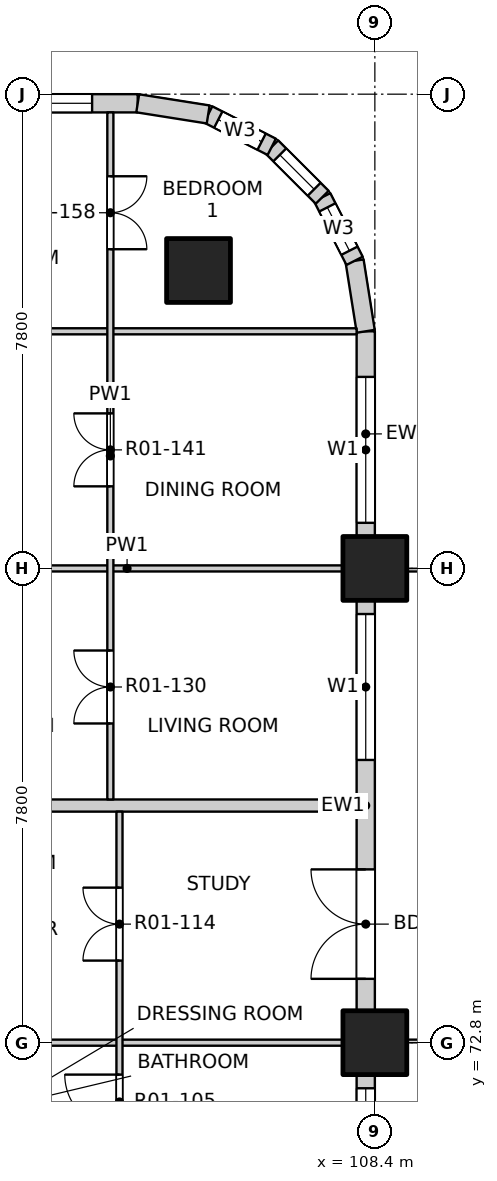
"""IFC4 building model, lengths in metres.
Left out: names, types, materials, properties, quantities, classifications, styles, units other than length and angle.
Written with IfcOpenShell. Run it as: python <this file> out.ifc"""

import sys

from ifc_helpers import new_model, si_unit, direction, frame, frame_2d, origin, origin_2d, place, context, subcontext, project, spatial, rectangle, extrude, element, fill, save


model = new_model("IFC4")
c1 = context("Model", 3, precision=1e-05, world=origin(), true_north=direction((0.0, 1.0)))
c2 = subcontext(c1, "Body", "Model", "MODEL_VIEW")
j1 = project(units=[si_unit("LENGTHUNIT", "METRE"), si_unit("PLANEANGLEUNIT", "RADIAN")], contexts=[c1])
p1 = place(None, origin())
s1 = spatial("IfcSite", under=j1, at=p1, CompositionType="ELEMENT")
p2 = place(p1, origin())
s2 = spatial("IfcBuilding", under=s1, at=p2, CompositionType="ELEMENT")
p3 = place(p2, frame((0.0, 0.0, 19.5)))
s3 = spatial("IfcBuildingStorey", under=s2, at=p3, CompositionType="ELEMENT", Elevation=19.5)
for number, where, z_axis, x_axis in (
    (1, (105.5, 85.5, -0.25), (0.0, 0.0, 1.0), (1.0, 0.0, 0.0)),
    (2, (108.4, 72.8, -0.25), (0.0, 0.0, 1.0), (1.0, 0.0, 0.0)),
    (3, (108.4, 80.6, -0.25), (0.0, 0.0, 1.0), (1.0, 0.0, 0.0)),
):
    element("IfcColumn", number, at=place(p3, frame(where, z_axis=z_axis, x_axis=x_axis)), inside=s3, PredefinedType="COLUMN", context=c2, shape_type="SweptSolid", body=[
        extrude(rectangle(XDim=1.05, YDim=1.05, at=origin_2d()), origin(), (0.0, 0.0, 1.0), 3.4),
    ])
p4 = place(p3, frame((108.25, 65.525, 0.0), z_axis=(0.0, 0.0, 1.0), x_axis=(0.0, 1.0, 0.0)))
e4 = element("IfcWall", 4, at=p4, inside=s3, PredefinedType="SOLIDWALL", context=c2, shape_type="SweptSolid", body=[
    extrude(rectangle(XDim=6.75, YDim=0.3, at=frame_2d((3.375, 0.0))), origin(), (0.0, 0.0, 1.0), 2.7),
])
p5 = place(p4, frame((0.225, 0.0, 0.9)))
e5 = element("IfcOpeningElement", 5, at=p5, cuts=e4, PredefinedType="OPENING", context=c2, shape_type="SweptSolid", body=[
    extrude(rectangle(XDim=2.4, YDim=1.8, at=frame_2d((1.2, 0.9))), frame((0.0, 0.16, 0.0), z_axis=(0.0, -1.0, 0.0), x_axis=(1.0, 0.0, 0.0)), (0.0, 0.0, 1.0), 0.32),
])
p6 = place(p4, frame((4.125, 0.0, 0.9)))
e6 = element("IfcOpeningElement", 6, at=p6, cuts=e4, PredefinedType="OPENING", context=c2, shape_type="SweptSolid", body=[
    extrude(rectangle(XDim=2.4, YDim=1.8, at=frame_2d((1.2, 0.9))), frame((0.0, 0.16, 0.0), z_axis=(0.0, -1.0, 0.0), x_axis=(1.0, 0.0, 0.0)), (0.0, 0.0, 1.0), 0.32),
])
p7 = place(p3, frame((108.25, 73.325, 0.0), z_axis=(0.0, 0.0, 1.0), x_axis=(0.0, 1.0, 0.0)))
e7 = element("IfcWall", 7, at=p7, inside=s3, PredefinedType="SOLIDWALL", context=c2, shape_type="SweptSolid", body=[
    extrude(rectangle(XDim=6.75, YDim=0.3, at=frame_2d((3.375, 0.0))), origin(), (0.0, 0.0, 1.0), 2.7),
])
p8 = place(p7, frame((0.525, 0.0, 0.0)))
e8 = element("IfcOpeningElement", 8, at=p8, cuts=e7, PredefinedType="OPENING", context=c2, shape_type="SweptSolid", body=[
    extrude(rectangle(XDim=1.8, YDim=2.4, at=frame_2d((0.9, 1.2))), frame((0.0, 0.16, 0.0), z_axis=(0.0, -1.0, 0.0), x_axis=(1.0, 0.0, 0.0)), (0.0, 0.0, 1.0), 0.32),
])
p9 = place(p7, frame((4.125, 0.0, 0.9)))
e9 = element("IfcOpeningElement", 9, at=p9, cuts=e7, PredefinedType="OPENING", context=c2, shape_type="SweptSolid", body=[
    extrude(rectangle(XDim=2.4, YDim=1.8, at=frame_2d((1.2, 0.9))), frame((0.0, 0.16, 0.0), z_axis=(0.0, -1.0, 0.0), x_axis=(1.0, 0.0, 0.0)), (0.0, 0.0, 1.0), 0.32),
])
p10 = place(p3, frame((108.25, 81.125, 0.0), z_axis=(0.0, 0.0, 1.0), x_axis=(0.0, 1.0, 0.0)))
e10 = element("IfcWall", 10, at=p10, inside=s3, PredefinedType="SOLIDWALL", context=c2, shape_type="SweptSolid", body=[
    extrude(rectangle(XDim=3.375, YDim=0.3, at=frame_2d((1.688, 0.0))), origin(), (0.0, 0.0, 1.0), 2.7),
])
p11 = place(p10, frame((0.225, 0.0, 0.9)))
e11 = element("IfcOpeningElement", 11, at=p11, cuts=e10, PredefinedType="OPENING", context=c2, shape_type="SweptSolid", body=[
    extrude(rectangle(XDim=2.4, YDim=1.8, at=frame_2d((1.2, 0.9))), frame((0.0, 0.16, 0.0), z_axis=(0.0, -1.0, 0.0), x_axis=(1.0, 0.0, 0.0)), (0.0, 0.0, 1.0), 0.32),
])
p12 = place(p3, frame((101.125, 88.25, 0.0), z_axis=(0.0, 0.0, 1.0), x_axis=(1.0, 0.0, 0.0)))
e12 = element("IfcWall", 12, at=p12, inside=s3, PredefinedType="SOLIDWALL", context=c2, shape_type="SweptSolid", body=[
    extrude(rectangle(XDim=3.375, YDim=0.3, at=frame_2d((1.688, 0.0))), origin(), (0.0, 0.0, 1.0), 2.7),
])
p13 = place(p12, frame((0.225, 0.0, 0.9)))
e13 = element("IfcOpeningElement", 13, at=p13, cuts=e12, PredefinedType="OPENING", context=c2, shape_type="SweptSolid", body=[
    extrude(rectangle(XDim=2.4, YDim=1.8, at=frame_2d((1.2, 0.9))), frame((0.0, 0.16, 0.0), z_axis=(0.0, -1.0, 0.0), x_axis=(1.0, 0.0, 0.0)), (0.0, 0.0, 1.0), 0.32),
])
p14 = place(p3, frame((108.25, 84.5, 0.0), z_axis=(0.0, 0.0, 1.0), x_axis=(-0.156496880861, 0.987678452879, 0.0)))
e14 = element("IfcWall", 14, at=p14, inside=s3, PredefinedType="SOLIDWALL", context=c2, shape_type="SweptSolid", body=[
    extrude(rectangle(XDim=1.173, YDim=0.3, at=frame_2d((0.586, 0.0))), origin(), (0.0, 0.0, 1.0), 2.7),
])
p15 = place(p3, frame((108.066, 85.659, 0.0), z_axis=(0.0, 0.0, 1.0), x_axis=(-0.454025524128, 0.890988677504, 0.0)))
e15 = element("IfcWall", 15, at=p15, inside=s3, PredefinedType="SOLIDWALL", context=c2, shape_type="SweptSolid", body=[
    extrude(rectangle(XDim=1.173, YDim=0.3, at=frame_2d((0.587, 0.0))), origin(), (0.0, 0.0, 1.0), 2.7),
])
p16 = place(p15, frame((0.187, 0.0, 0.9)))
e16 = element("IfcOpeningElement", 16, at=p16, cuts=e15, PredefinedType="OPENING", context=c2, shape_type="SweptSolid", body=[
    extrude(rectangle(XDim=0.8, YDim=1.2, at=frame_2d((0.4, 0.6))), frame((0.0, 0.16, 0.0), z_axis=(0.0, -1.0, 0.0), x_axis=(1.0, 0.0, 0.0)), (0.0, 0.0, 1.0), 0.32),
])
p17 = place(p3, frame((107.534, 86.704, 0.0), z_axis=(0.0, 0.0, 1.0), x_axis=(-0.707106781187, 0.707106781187, 0.0)))
e17 = element("IfcWall", 17, at=p17, inside=s3, PredefinedType="SOLIDWALL", context=c2, shape_type="SweptSolid", body=[
    extrude(rectangle(XDim=1.173, YDim=0.3, at=frame_2d((0.586, 0.0))), origin(), (0.0, 0.0, 1.0), 2.7),
])
p18 = place(p17, frame((0.187, 0.0, 0.9)))
e18 = element("IfcOpeningElement", 18, at=p18, cuts=e17, PredefinedType="OPENING", context=c2, shape_type="SweptSolid", body=[
    extrude(rectangle(XDim=0.8, YDim=1.2, at=frame_2d((0.4, 0.6))), frame((0.0, 0.16, 0.0), z_axis=(0.0, -1.0, 0.0), x_axis=(1.0, 0.0, 0.0)), (0.0, 0.0, 1.0), 0.32),
])
p19 = place(p3, frame((106.704, 87.534, 0.0), z_axis=(0.0, 0.0, 1.0), x_axis=(-0.890988677504, 0.454025524128, 0.0)))
e19 = element("IfcWall", 19, at=p19, inside=s3, PredefinedType="SOLIDWALL", context=c2, shape_type="SweptSolid", body=[
    extrude(rectangle(XDim=1.173, YDim=0.3, at=frame_2d((0.587, 0.0))), origin(), (0.0, 0.0, 1.0), 2.7),
])
p20 = place(p19, frame((0.187, 0.0, 0.9)))
e20 = element("IfcOpeningElement", 20, at=p20, cuts=e19, PredefinedType="OPENING", context=c2, shape_type="SweptSolid", body=[
    extrude(rectangle(XDim=0.8, YDim=1.2, at=frame_2d((0.4, 0.6))), frame((0.0, 0.16, 0.0), z_axis=(0.0, -1.0, 0.0), x_axis=(1.0, 0.0, 0.0)), (0.0, 0.0, 1.0), 0.32),
])
p21 = place(p3, frame((105.659, 88.066, 0.0), z_axis=(0.0, 0.0, 1.0), x_axis=(-0.987678452879, 0.156496880861, 0.0)))
e21 = element("IfcWall", 21, at=p21, inside=s3, PredefinedType="SOLIDWALL", context=c2, shape_type="SweptSolid", body=[
    extrude(rectangle(XDim=1.173, YDim=0.3, at=frame_2d((0.586, 0.0))), origin(), (0.0, 0.0, 1.0), 2.7),
])
p22 = place(p3, frame((100.55, 72.8, 0.0), z_axis=(0.0, 0.0, 1.0), x_axis=(1.0, 0.0, 0.0)))
e22 = element("IfcWall", 22, at=p22, inside=s3, PredefinedType="PARTITIONING", context=c2, shape_type="SweptSolid", body=[
    extrude(rectangle(XDim=7.55, YDim=0.1, at=frame_2d((3.775, 0.0))), origin(), (0.0, 0.0, 1.0), 2.55),
])
p23 = place(p3, frame((96.6, 76.7, 0.0), z_axis=(0.0, 0.0, 1.0), x_axis=(1.0, 0.0, 0.0)))
e23 = element("IfcWall", 23, at=p23, inside=s3, PredefinedType="PARTITIONING", context=c2, shape_type="SweptSolid", body=[
    extrude(rectangle(XDim=11.5, YDim=0.2, at=frame_2d((5.75, 0.0))), origin(), (0.0, 0.0, 1.0), 3.15),
])
p24 = place(p3, frame((100.55, 80.6, 0.0), z_axis=(0.0, 0.0, 1.0), x_axis=(1.0, 0.0, 0.0)))
e24 = element("IfcWall", 24, at=p24, inside=s3, PredefinedType="PARTITIONING", context=c2, shape_type="SweptSolid", body=[
    extrude(rectangle(XDim=7.55, YDim=0.1, at=frame_2d((3.775, 0.0))), origin(), (0.0, 0.0, 1.0), 2.55),
])
p25 = place(p3, frame((96.6, 84.5, 0.0), z_axis=(0.0, 0.0, 1.0), x_axis=(1.0, 0.0, 0.0)))
e25 = element("IfcWall", 25, at=p25, inside=s3, PredefinedType="PARTITIONING", context=c2, shape_type="SweptSolid", body=[
    extrude(rectangle(XDim=11.5, YDim=0.1, at=frame_2d((5.75, 0.0))), origin(), (0.0, 0.0, 1.0), 3.15),
])
p26 = place(p25, frame((2.635, 0.0, 0.0)))
e26 = element("IfcOpeningElement", 26, at=p26, cuts=e25, PredefinedType="OPENING", context=c2, shape_type="SweptSolid", body=[
    extrude(rectangle(XDim=0.9, YDim=2.1, at=frame_2d((0.45, 1.05))), frame((0.0, 0.06, 0.0), z_axis=(0.0, -1.0, 0.0), x_axis=(1.0, 0.0, 0.0)), (0.0, 0.0, 1.0), 0.12),
])
p27 = place(p3, frame((104.05, 76.8, 0.0), z_axis=(0.0, 0.0, 1.0), x_axis=(0.0, 1.0, 0.0)))
e27 = element("IfcWall", 27, at=p27, inside=s3, PredefinedType="PARTITIONING", context=c2, shape_type="SweptSolid", body=[
    extrude(rectangle(XDim=11.3, YDim=0.1, at=frame_2d((5.65, 0.0))), origin(), (0.0, 0.0, 1.0), 3.15),
])
p28 = place(p27, frame((1.25, 0.0, 0.0)))
e28 = element("IfcOpeningElement", 28, at=p28, cuts=e27, PredefinedType="OPENING", context=c2, shape_type="SweptSolid", body=[
    extrude(rectangle(XDim=1.2, YDim=2.1, at=frame_2d((0.6, 1.05))), frame((0.0, 0.06, 0.0), z_axis=(0.0, -1.0, 0.0), x_axis=(1.0, 0.0, 0.0)), (0.0, 0.0, 1.0), 0.12),
])
p29 = place(p27, frame((5.15, 0.0, 0.0)))
e29 = element("IfcOpeningElement", 29, at=p29, cuts=e27, PredefinedType="OPENING", context=c2, shape_type="SweptSolid", body=[
    extrude(rectangle(XDim=1.2, YDim=2.1, at=frame_2d((0.6, 1.05))), frame((0.0, 0.06, 0.0), z_axis=(0.0, -1.0, 0.0), x_axis=(1.0, 0.0, 0.0)), (0.0, 0.0, 1.0), 0.12),
])
p30 = place(p27, frame((9.05, 0.0, 0.0)))
e30 = element("IfcOpeningElement", 30, at=p30, cuts=e27, PredefinedType="OPENING", context=c2, shape_type="SweptSolid", body=[
    extrude(rectangle(XDim=1.2, YDim=2.1, at=frame_2d((0.6, 1.05))), frame((0.0, 0.06, 0.0), z_axis=(0.0, -1.0, 0.0), x_axis=(1.0, 0.0, 0.0)), (0.0, 0.0, 1.0), 0.12),
])
p31 = place(p3, frame((104.2, 61.2, 0.0), z_axis=(0.0, 0.0, 1.0), x_axis=(0.0, 1.0, 0.0)))
e31 = element("IfcWall", 31, at=p31, inside=s3, PredefinedType="PARTITIONING", context=c2, shape_type="SweptSolid", body=[
    extrude(rectangle(XDim=15.4, YDim=0.1, at=frame_2d((7.7, 0.0))), origin(), (0.0, 0.0, 1.0), 3.15),
])
p32 = place(p31, frame((0.425, 0.0, 0.0)))
e32 = element("IfcOpeningElement", 32, at=p32, cuts=e31, PredefinedType="OPENING", context=c2, shape_type="SweptSolid", body=[
    extrude(rectangle(XDim=0.9, YDim=2.1, at=frame_2d((0.45, 1.05))), frame((0.0, 0.06, 0.0), z_axis=(0.0, -1.0, 0.0), x_axis=(1.0, 0.0, 0.0)), (0.0, 0.0, 1.0), 0.12),
])
p33 = place(p31, frame((2.375, 0.0, 0.0)))
e33 = element("IfcOpeningElement", 33, at=p33, cuts=e31, PredefinedType="OPENING", context=c2, shape_type="SweptSolid", body=[
    extrude(rectangle(XDim=0.9, YDim=2.1, at=frame_2d((0.45, 1.05))), frame((0.0, 0.06, 0.0), z_axis=(0.0, -1.0, 0.0), x_axis=(1.0, 0.0, 0.0)), (0.0, 0.0, 1.0), 0.12),
])
p34 = place(p31, frame((5.15, 0.0, 0.0)))
e34 = element("IfcOpeningElement", 34, at=p34, cuts=e31, PredefinedType="OPENING", context=c2, shape_type="SweptSolid", body=[
    extrude(rectangle(XDim=1.2, YDim=2.1, at=frame_2d((0.6, 1.05))), frame((0.0, 0.06, 0.0), z_axis=(0.0, -1.0, 0.0), x_axis=(1.0, 0.0, 0.0)), (0.0, 0.0, 1.0), 0.12),
])
p35 = place(p31, frame((8.225, 0.0, 0.0)))
e35 = element("IfcOpeningElement", 35, at=p35, cuts=e31, PredefinedType="OPENING", context=c2, shape_type="SweptSolid", body=[
    extrude(rectangle(XDim=0.9, YDim=2.1, at=frame_2d((0.45, 1.05))), frame((0.0, 0.06, 0.0), z_axis=(0.0, -1.0, 0.0), x_axis=(1.0, 0.0, 0.0)), (0.0, 0.0, 1.0), 0.12),
])
p36 = place(p31, frame((10.175, 0.0, 0.0)))
e36 = element("IfcOpeningElement", 36, at=p36, cuts=e31, PredefinedType="OPENING", context=c2, shape_type="SweptSolid", body=[
    extrude(rectangle(XDim=0.9, YDim=2.1, at=frame_2d((0.45, 1.05))), frame((0.0, 0.06, 0.0), z_axis=(0.0, -1.0, 0.0), x_axis=(1.0, 0.0, 0.0)), (0.0, 0.0, 1.0), 0.12),
])
p37 = place(p31, frame((12.95, 0.0, 0.0)))
e37 = element("IfcOpeningElement", 37, at=p37, cuts=e31, PredefinedType="OPENING", context=c2, shape_type="SweptSolid", body=[
    extrude(rectangle(XDim=1.2, YDim=2.1, at=frame_2d((0.6, 1.05))), frame((0.0, 0.06, 0.0), z_axis=(0.0, -1.0, 0.0), x_axis=(1.0, 0.0, 0.0)), (0.0, 0.0, 1.0), 0.12),
])
p38 = place(p6, origin())
e38 = element("IfcWindow", 38, at=p38, inside=s3, PartitioningType="DOUBLE_PANEL_VERTICAL", PredefinedType="WINDOW", context=c2, shape_type="SweptSolid", body=[
    extrude(rectangle(XDim=2.4, YDim=1.8, at=frame_2d((1.2, 0.9))), frame((0.0, 0.03, 0.0), z_axis=(0.0, -1.0, 0.0), x_axis=(1.0, 0.0, 0.0)), (0.0, 0.0, 1.0), 0.06),
])
fill(e6, e38)
p39 = place(p8, origin())
e39 = element("IfcDoor", 39, at=p39, inside=s3, OperationType="DOUBLE_DOOR_SINGLE_SWING", PredefinedType="DOOR", context=c2, shape_type="SweptSolid", body=[
    extrude(rectangle(XDim=1.8, YDim=2.4, at=frame_2d((0.9, 1.2))), frame((0.0, 0.025, 0.0), z_axis=(0.0, -1.0, 0.0), x_axis=(1.0, 0.0, 0.0)), (0.0, 0.0, 1.0), 0.05),
])
fill(e8, e39)
p40 = place(p9, origin())
e40 = element("IfcWindow", 40, at=p40, inside=s3, PartitioningType="DOUBLE_PANEL_VERTICAL", PredefinedType="WINDOW", context=c2, shape_type="SweptSolid", body=[
    extrude(rectangle(XDim=2.4, YDim=1.8, at=frame_2d((1.2, 0.9))), frame((0.0, 0.03, 0.0), z_axis=(0.0, -1.0, 0.0), x_axis=(1.0, 0.0, 0.0)), (0.0, 0.0, 1.0), 0.06),
])
fill(e9, e40)
p41 = place(p11, origin())
e41 = element("IfcWindow", 41, at=p41, inside=s3, PartitioningType="DOUBLE_PANEL_VERTICAL", PredefinedType="WINDOW", context=c2, shape_type="SweptSolid", body=[
    extrude(rectangle(XDim=2.4, YDim=1.8, at=frame_2d((1.2, 0.9))), frame((0.0, 0.03, 0.0), z_axis=(0.0, -1.0, 0.0), x_axis=(1.0, 0.0, 0.0)), (0.0, 0.0, 1.0), 0.06),
])
fill(e11, e41)
p42 = place(p13, origin())
e42 = element("IfcWindow", 42, at=p42, inside=s3, PartitioningType="DOUBLE_PANEL_VERTICAL", PredefinedType="WINDOW", context=c2, shape_type="SweptSolid", body=[
    extrude(rectangle(XDim=2.4, YDim=1.8, at=frame_2d((1.2, 0.9))), frame((0.0, 0.03, 0.0), z_axis=(0.0, -1.0, 0.0), x_axis=(1.0, 0.0, 0.0)), (0.0, 0.0, 1.0), 0.06),
])
fill(e13, e42)
p43 = place(p16, origin())
e43 = element("IfcWindow", 43, at=p43, inside=s3, PartitioningType="SINGLE_PANEL", PredefinedType="WINDOW", context=c2, shape_type="SweptSolid", body=[
    extrude(rectangle(XDim=0.8, YDim=1.2, at=frame_2d((0.4, 0.6))), frame((0.0, 0.03, 0.0), z_axis=(0.0, -1.0, 0.0), x_axis=(1.0, 0.0, 0.0)), (0.0, 0.0, 1.0), 0.06),
])
fill(e16, e43)
p44 = place(p18, origin())
e44 = element("IfcWindow", 44, at=p44, inside=s3, PartitioningType="SINGLE_PANEL", PredefinedType="WINDOW", context=c2, shape_type="SweptSolid", body=[
    extrude(rectangle(XDim=0.8, YDim=1.2, at=frame_2d((0.4, 0.6))), frame((0.0, 0.03, 0.0), z_axis=(0.0, -1.0, 0.0), x_axis=(1.0, 0.0, 0.0)), (0.0, 0.0, 1.0), 0.06),
])
fill(e18, e44)
p45 = place(p20, origin())
e45 = element("IfcWindow", 45, at=p45, inside=s3, PartitioningType="SINGLE_PANEL", PredefinedType="WINDOW", context=c2, shape_type="SweptSolid", body=[
    extrude(rectangle(XDim=0.8, YDim=1.2, at=frame_2d((0.4, 0.6))), frame((0.0, 0.03, 0.0), z_axis=(0.0, -1.0, 0.0), x_axis=(1.0, 0.0, 0.0)), (0.0, 0.0, 1.0), 0.06),
])
fill(e20, e45)
p46 = place(p36, origin())
e46 = element("IfcDoor", 46, at=p46, inside=s3, OperationType="SINGLE_SWING_RIGHT", PredefinedType="DOOR", context=c2, shape_type="SweptSolid", body=[
    extrude(rectangle(XDim=0.9, YDim=2.1, at=frame_2d((0.45, 1.05))), frame((0.0, 0.025, 0.0), z_axis=(0.0, -1.0, 0.0), x_axis=(1.0, 0.0, 0.0)), (0.0, 0.0, 1.0), 0.05),
])
fill(e36, e46)
p47 = place(p37, origin())
e47 = element("IfcDoor", 47, at=p47, inside=s3, OperationType="DOUBLE_DOOR_SINGLE_SWING", PredefinedType="DOOR", context=c2, shape_type="SweptSolid", body=[
    extrude(rectangle(XDim=1.2, YDim=2.1, at=frame_2d((0.6, 1.05))), frame((0.0, 0.025, 0.0), z_axis=(0.0, -1.0, 0.0), x_axis=(1.0, 0.0, 0.0)), (0.0, 0.0, 1.0), 0.05),
])
fill(e37, e47)
p48 = place(p28, origin())
e48 = element("IfcDoor", 48, at=p48, inside=s3, OperationType="DOUBLE_DOOR_SINGLE_SWING", PredefinedType="DOOR", context=c2, shape_type="SweptSolid", body=[
    extrude(rectangle(XDim=1.2, YDim=2.1, at=frame_2d((0.6, 1.05))), frame((0.0, 0.025, 0.0), z_axis=(0.0, -1.0, 0.0), x_axis=(1.0, 0.0, 0.0)), (0.0, 0.0, 1.0), 0.05),
])
fill(e28, e48)
p49 = place(p29, origin())
e49 = element("IfcDoor", 49, at=p49, inside=s3, OperationType="DOUBLE_DOOR_SINGLE_SWING", PredefinedType="DOOR", context=c2, shape_type="SweptSolid", body=[
    extrude(rectangle(XDim=1.2, YDim=2.1, at=frame_2d((0.6, 1.05))), frame((0.0, 0.025, 0.0), z_axis=(0.0, -1.0, 0.0), x_axis=(1.0, 0.0, 0.0)), (0.0, 0.0, 1.0), 0.05),
])
fill(e29, e49)
p50 = place(p30, origin())
e50 = element("IfcDoor", 50, at=p50, inside=s3, OperationType="DOUBLE_DOOR_SINGLE_SWING", PredefinedType="DOOR", context=c2, shape_type="SweptSolid", body=[
    extrude(rectangle(XDim=1.2, YDim=2.1, at=frame_2d((0.6, 1.05))), frame((0.0, 0.025, 0.0), z_axis=(0.0, -1.0, 0.0), x_axis=(1.0, 0.0, 0.0)), (0.0, 0.0, 1.0), 0.05),
])
fill(e30, e50)
save(model, sys.argv[1])
